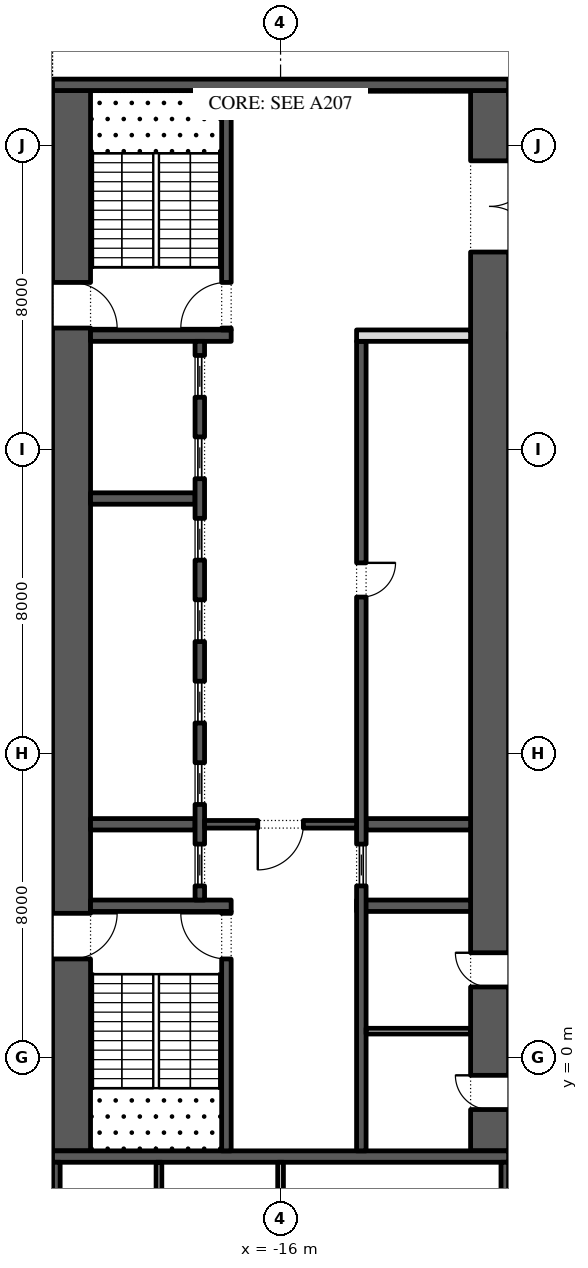
"""IFC4 building model, lengths in metres.
Left out: names, types, materials, properties, quantities, classifications, styles, units other than length and angle.
Written with IfcOpenShell. Run it as: python <this file> out.ifc"""

import sys

from ifc_helpers import new_model, si_unit, direction, frame, frame_2d, origin, place, context, subcontext, project, spatial, rectangle, extrude, element, fill, save


model = new_model("IFC4")
c1 = context("Model", 3, precision=1e-05, world=origin(), true_north=direction((0.0, 1.0)))
c2 = subcontext(c1, "Body", "Model", "MODEL_VIEW")
j1 = project(units=[si_unit("LENGTHUNIT", "METRE"), si_unit("PLANEANGLEUNIT", "RADIAN")], contexts=[c1])
p1 = place(None, origin())
s1 = spatial("IfcSite", under=j1, at=p1, CompositionType="ELEMENT")
p2 = place(p1, origin())
s2 = spatial("IfcBuilding", under=s1, at=p2, CompositionType="ELEMENT")
p3 = place(p2, frame((0.0, 0.0, 24.0)))
s3 = spatial("IfcBuildingStorey", under=s2, at=p3, CompositionType="ELEMENT", Elevation=24.0)
p4 = place(p3, frame((-21.5, -2.45, 0.0), z_axis=(0.0, 0.0, 1.0), x_axis=(0.0, 1.0, 0.0)))
e1 = element("IfcWall", 1, at=p4, inside=s3, PredefinedType="SHEAR", context=c2, shape_type="SweptSolid", body=[
    extrude(rectangle(XDim=27.9, YDim=1.0, at=frame_2d((13.95, 0.0))), origin(), (0.0, 0.0, 1.0), 4.5),
])
p5 = place(p4, frame((5.05, 0.0, 0.0)))
e2 = element("IfcOpeningElement", 2, at=p5, cuts=e1, PredefinedType="OPENING", context=c2, shape_type="SweptSolid", body=[
    extrude(rectangle(XDim=1.2, YDim=2.1, at=frame_2d((0.6, 1.05))), frame((0.0, 0.51, 0.0), z_axis=(0.0, -1.0, 0.0), x_axis=(1.0, 0.0, 0.0)), (0.0, 0.0, 1.0), 1.02),
])
p6 = place(p4, frame((21.65, 0.0, 0.0)))
e3 = element("IfcOpeningElement", 3, at=p6, cuts=e1, PredefinedType="OPENING", context=c2, shape_type="SweptSolid", body=[
    extrude(rectangle(XDim=1.2, YDim=2.1, at=frame_2d((0.6, 1.05))), frame((0.0, 0.51, 0.0), z_axis=(0.0, -1.0, 0.0), x_axis=(1.0, 0.0, 0.0)), (0.0, 0.0, 1.0), 1.02),
])
p7 = place(p3, frame((-10.5, -2.45, 0.0), z_axis=(0.0, 0.0, 1.0), x_axis=(0.0, 1.0, 0.0)))
e4 = element("IfcWall", 4, at=p7, inside=s3, PredefinedType="SHEAR", context=c2, shape_type="SweptSolid", body=[
    extrude(rectangle(XDim=27.9, YDim=1.0, at=frame_2d((13.95, 0.0))), origin(), (0.0, 0.0, 1.0), 4.5),
])
p8 = place(p7, frame((23.65, 0.0, 0.0)))
e5 = element("IfcOpeningElement", 5, at=p8, cuts=e4, PredefinedType="OPENING", context=c2, shape_type="SweptSolid", body=[
    extrude(rectangle(XDim=2.4, YDim=2.1, at=frame_2d((1.2, 1.05))), frame((0.0, 0.51, 0.0), z_axis=(0.0, -1.0, 0.0), x_axis=(1.0, 0.0, 0.0)), (0.0, 0.0, 1.0), 1.02),
])
p9 = place(p7, frame((1.087, 0.0, 0.0)))
e6 = element("IfcOpeningElement", 6, at=p9, cuts=e4, PredefinedType="OPENING", context=c2, shape_type="SweptSolid", body=[
    extrude(rectangle(XDim=0.9, YDim=2.1, at=frame_2d((0.45, 1.05))), frame((0.0, 0.51, 0.0), z_axis=(0.0, -1.0, 0.0), x_axis=(1.0, 0.0, 0.0)), (0.0, 0.0, 1.0), 1.02),
])
p10 = place(p7, frame((4.312, 0.0, 0.0)))
e7 = element("IfcOpeningElement", 7, at=p10, cuts=e4, PredefinedType="OPENING", context=c2, shape_type="SweptSolid", body=[
    extrude(rectangle(XDim=0.9, YDim=2.1, at=frame_2d((0.45, 1.05))), frame((0.0, 0.51, 0.0), z_axis=(0.0, -1.0, 0.0), x_axis=(1.0, 0.0, 0.0)), (0.0, 0.0, 1.0), 1.02),
])
for number, where, z_axis, x_axis in (
    (8, (-22.0, -2.6, 0.0), (0.0, 0.0, 1.0), (1.0, 0.0, 0.0)),
    (9, (-22.0, 25.6, 0.0), (0.0, 0.0, 1.0), (1.0, 0.0, 0.0)),
):
    element("IfcWall", number, at=place(p3, frame(where, z_axis=z_axis, x_axis=x_axis)), inside=s3, PredefinedType="SHEAR", context=c2, shape_type="SweptSolid", body=[
        extrude(rectangle(XDim=12.0, YDim=0.3, at=frame_2d((6.0, 0.0))), origin(), (0.0, 0.0, 1.0), 4.5),
    ])
p11 = place(p3, frame((-21.0, 4.0, 0.0), z_axis=(0.0, 0.0, 1.0), x_axis=(1.0, 0.0, 0.0)))
e10 = element("IfcWall", 10, at=p11, inside=s3, PredefinedType="SHEAR", context=c2, shape_type="SweptSolid", body=[
    extrude(rectangle(XDim=3.7, YDim=0.3, at=frame_2d((1.85, 0.0))), origin(), (0.0, 0.0, 1.0), 4.5),
])
p12 = place(p3, frame((-17.425, -2.45, 0.0), z_axis=(0.0, 0.0, 1.0), x_axis=(0.0, 1.0, 0.0)))
e11 = element("IfcWall", 11, at=p12, inside=s3, PredefinedType="SHEAR", context=c2, shape_type="SweptSolid", body=[
    extrude(rectangle(XDim=6.3, YDim=0.25, at=frame_2d((3.15, 0.0))), origin(), (0.0, 0.0, 1.0), 4.5),
])
p13 = place(p12, frame((5.05, 0.0, 0.0)))
e12 = element("IfcOpeningElement", 12, at=p13, cuts=e11, PredefinedType="OPENING", context=c2, shape_type="SweptSolid", body=[
    extrude(rectangle(XDim=1.2, YDim=2.1, at=frame_2d((0.6, 1.05))), frame((0.0, 0.135, 0.0), z_axis=(0.0, -1.0, 0.0), x_axis=(1.0, 0.0, 0.0)), (0.0, 0.0, 1.0), 0.27),
])
p14 = place(p3, frame((-21.0, 19.0, 0.0), z_axis=(0.0, 0.0, 1.0), x_axis=(1.0, 0.0, 0.0)))
e13 = element("IfcWall", 13, at=p14, inside=s3, PredefinedType="SHEAR", context=c2, shape_type="SweptSolid", body=[
    extrude(rectangle(XDim=3.7, YDim=0.3, at=frame_2d((1.85, 0.0))), origin(), (0.0, 0.0, 1.0), 4.5),
])
p15 = place(p3, frame((-17.425, 19.15, 0.0), z_axis=(0.0, 0.0, 1.0), x_axis=(0.0, 1.0, 0.0)))
e14 = element("IfcWall", 14, at=p15, inside=s3, PredefinedType="SHEAR", context=c2, shape_type="SweptSolid", body=[
    extrude(rectangle(XDim=6.3, YDim=0.25, at=frame_2d((3.15, 0.0))), origin(), (0.0, 0.0, 1.0), 4.5),
])
p16 = place(p15, frame((0.05, 0.0, 0.0)))
e15 = element("IfcOpeningElement", 15, at=p16, cuts=e14, PredefinedType="OPENING", context=c2, shape_type="SweptSolid", body=[
    extrude(rectangle(XDim=1.2, YDim=2.1, at=frame_2d((0.6, 1.05))), frame((0.0, 0.135, 0.0), z_axis=(0.0, -1.0, 0.0), x_axis=(1.0, 0.0, 0.0)), (0.0, 0.0, 1.0), 0.27),
])
for number, where, z_axis, x_axis in (
    (16, (-21.0, 6.143, 0.0), (0.0, 0.0, 1.0), (1.0, 0.0, 0.0)),
    (17, (-21.0, 14.714, 0.0), (0.0, 0.0, 1.0), (1.0, 0.0, 0.0)),
):
    element("IfcWall", number, at=place(p3, frame(where, z_axis=z_axis, x_axis=x_axis)), inside=s3, PredefinedType="SHEAR", context=c2, shape_type="SweptSolid", body=[
        extrude(rectangle(XDim=2.75, YDim=0.3, at=frame_2d((1.375, 0.0))), origin(), (0.0, 0.0, 1.0), 4.5),
    ])
p17 = place(p3, frame((-18.125, 4.15, 0.0), z_axis=(0.0, 0.0, 1.0), x_axis=(0.0, 1.0, 0.0)))
e18 = element("IfcWall", 18, at=p17, inside=s3, PredefinedType="SHEAR", context=c2, shape_type="SweptSolid", body=[
    extrude(rectangle(XDim=14.7, YDim=0.25, at=frame_2d((7.35, 0.0))), origin(), (0.0, 0.0, 1.0), 4.5),
])
p18 = place(p17, frame((0.371, 0.0, 0.0)))
e19 = element("IfcOpeningElement", 19, at=p18, cuts=e18, PredefinedType="OPENING", context=c2, shape_type="SweptSolid", body=[
    extrude(rectangle(XDim=1.1, YDim=2.1, at=frame_2d((0.55, 1.05))), frame((0.0, 0.135, 0.0), z_axis=(0.0, -1.0, 0.0), x_axis=(1.0, 0.0, 0.0)), (0.0, 0.0, 1.0), 0.27),
])
p19 = place(p17, frame((2.514, 0.0, 0.0)))
e20 = element("IfcOpeningElement", 20, at=p19, cuts=e18, PredefinedType="OPENING", context=c2, shape_type="SweptSolid", body=[
    extrude(rectangle(XDim=1.1, YDim=2.1, at=frame_2d((0.55, 1.05))), frame((0.0, 0.135, 0.0), z_axis=(0.0, -1.0, 0.0), x_axis=(1.0, 0.0, 0.0)), (0.0, 0.0, 1.0), 0.27),
])
p20 = place(p17, frame((4.657, 0.0, 0.0)))
e21 = element("IfcOpeningElement", 21, at=p20, cuts=e18, PredefinedType="OPENING", context=c2, shape_type="SweptSolid", body=[
    extrude(rectangle(XDim=1.1, YDim=2.1, at=frame_2d((0.55, 1.05))), frame((0.0, 0.135, 0.0), z_axis=(0.0, -1.0, 0.0), x_axis=(1.0, 0.0, 0.0)), (0.0, 0.0, 1.0), 0.27),
])
p21 = place(p17, frame((6.8, 0.0, 0.0)))
e22 = element("IfcOpeningElement", 22, at=p21, cuts=e18, PredefinedType="OPENING", context=c2, shape_type="SweptSolid", body=[
    extrude(rectangle(XDim=1.1, YDim=2.1, at=frame_2d((0.55, 1.05))), frame((0.0, 0.135, 0.0), z_axis=(0.0, -1.0, 0.0), x_axis=(1.0, 0.0, 0.0)), (0.0, 0.0, 1.0), 0.27),
])
p22 = place(p17, frame((8.943, 0.0, 0.0)))
e23 = element("IfcOpeningElement", 23, at=p22, cuts=e18, PredefinedType="OPENING", context=c2, shape_type="SweptSolid", body=[
    extrude(rectangle(XDim=1.1, YDim=2.1, at=frame_2d((0.55, 1.05))), frame((0.0, 0.135, 0.0), z_axis=(0.0, -1.0, 0.0), x_axis=(1.0, 0.0, 0.0)), (0.0, 0.0, 1.0), 0.27),
])
p23 = place(p17, frame((11.086, 0.0, 0.0)))
e24 = element("IfcOpeningElement", 24, at=p23, cuts=e18, PredefinedType="OPENING", context=c2, shape_type="SweptSolid", body=[
    extrude(rectangle(XDim=1.1, YDim=2.1, at=frame_2d((0.55, 1.05))), frame((0.0, 0.135, 0.0), z_axis=(0.0, -1.0, 0.0), x_axis=(1.0, 0.0, 0.0)), (0.0, 0.0, 1.0), 0.27),
])
p24 = place(p17, frame((13.229, 0.0, 0.0)))
e25 = element("IfcOpeningElement", 25, at=p24, cuts=e18, PredefinedType="OPENING", context=c2, shape_type="SweptSolid", body=[
    extrude(rectangle(XDim=1.1, YDim=2.1, at=frame_2d((0.55, 1.05))), frame((0.0, 0.135, 0.0), z_axis=(0.0, -1.0, 0.0), x_axis=(1.0, 0.0, 0.0)), (0.0, 0.0, 1.0), 0.27),
])
p25 = place(p3, frame((-14.0, 4.0, 0.0), z_axis=(0.0, 0.0, 1.0), x_axis=(1.0, 0.0, 0.0)))
e26 = element("IfcWall", 26, at=p25, inside=s3, PredefinedType="SHEAR", context=c2, shape_type="SweptSolid", body=[
    extrude(rectangle(XDim=3.0, YDim=0.3, at=frame_2d((1.5, 0.0))), origin(), (0.0, 0.0, 1.0), 4.5),
])
p26 = place(p3, frame((-13.75, 6.143, 0.0), z_axis=(0.0, 0.0, 1.0), x_axis=(1.0, 0.0, 0.0)))
e27 = element("IfcWall", 27, at=p26, inside=s3, PredefinedType="SHEAR", context=c2, shape_type="SweptSolid", body=[
    extrude(rectangle(XDim=2.75, YDim=0.3, at=frame_2d((1.375, 0.0))), origin(), (0.0, 0.0, 1.0), 4.5),
])
p27 = place(p3, frame((-13.875, -2.45, 0.0), z_axis=(0.0, 0.0, 1.0), x_axis=(0.0, 1.0, 0.0)))
e28 = element("IfcWall", 28, at=p27, inside=s3, PredefinedType="SHEAR", context=c2, shape_type="SweptSolid", body=[
    extrude(rectangle(XDim=21.3, YDim=0.25, at=frame_2d((10.65, 0.0))), origin(), (0.0, 0.0, 1.0), 4.5),
])
p28 = place(p27, frame((14.571, 0.0, 0.0)))
e29 = element("IfcOpeningElement", 29, at=p28, cuts=e28, PredefinedType="OPENING", context=c2, shape_type="SweptSolid", body=[
    extrude(rectangle(XDim=0.9, YDim=2.1, at=frame_2d((0.45, 1.05))), frame((0.0, 0.135, 0.0), z_axis=(0.0, -1.0, 0.0), x_axis=(1.0, 0.0, 0.0)), (0.0, 0.0, 1.0), 0.27),
])
p29 = place(p27, frame((6.971, 0.0, 0.0)))
e30 = element("IfcOpeningElement", 30, at=p29, cuts=e28, PredefinedType="OPENING", context=c2, shape_type="SweptSolid", body=[
    extrude(rectangle(XDim=1.1, YDim=2.1, at=frame_2d((0.55, 1.05))), frame((0.0, 0.135, 0.0), z_axis=(0.0, -1.0, 0.0), x_axis=(1.0, 0.0, 0.0)), (0.0, 0.0, 1.0), 0.27),
])
p30 = place(p3, frame((-14.0, 19.0, 0.0), z_axis=(0.0, 0.0, 1.0), x_axis=(1.0, 0.0, 0.0)))
e31 = element("IfcWall", 31, at=p30, inside=s3, PredefinedType="PARTITIONING", context=c2, shape_type="SweptSolid", body=[
    extrude(rectangle(XDim=3.0, YDim=0.3, at=frame_2d((1.5, 0.0))), origin(), (0.0, 0.0, 1.0), 4.5),
])
p31 = place(p3, frame((-18.0, 6.143, 0.0), z_axis=(0.0, 0.0, 1.0), x_axis=(1.0, 0.0, 0.0)))
e32 = element("IfcWall", 32, at=p31, inside=s3, PredefinedType="SHEAR", context=c2, shape_type="SweptSolid", body=[
    extrude(rectangle(XDim=4.0, YDim=0.2, at=frame_2d((2.0, 0.0))), origin(), (0.0, 0.0, 1.0), 4.5),
])
p32 = place(p31, frame((1.4, 0.0, 0.0)))
e33 = element("IfcOpeningElement", 33, at=p32, cuts=e32, PredefinedType="OPENING", context=c2, shape_type="SweptSolid", body=[
    extrude(rectangle(XDim=1.2, YDim=2.1, at=frame_2d((0.6, 1.05))), frame((0.0, 0.11, 0.0), z_axis=(0.0, -1.0, 0.0), x_axis=(1.0, 0.0, 0.0)), (0.0, 0.0, 1.0), 0.22),
])
p33 = place(p3, frame((-13.75, 0.7, 0.0), z_axis=(0.0, 0.0, 1.0), x_axis=(1.0, 0.0, 0.0)))
e34 = element("IfcWall", 34, at=p33, inside=s3, PredefinedType="PARTITIONING", context=c2, shape_type="SweptSolid", body=[
    extrude(rectangle(XDim=2.75, YDim=0.15, at=frame_2d((1.375, 0.0))), origin(), (0.0, 0.0, 1.0), 4.5),
])
p34 = place(p3, frame((-21.9, -15.8, 0.0), z_axis=(0.0, 0.0, 1.0), x_axis=(0.0, 1.0, 0.0)))
e35 = element("IfcWall", 35, at=p34, inside=s3, PredefinedType="SHEAR", context=c2, shape_type="SweptSolid", body=[
    extrude(rectangle(XDim=13.05, YDim=0.2, at=frame_2d((6.525, 0.0))), origin(), (0.0, 0.0, 1.0), 4.5),
])
p35 = place(p34, frame((4.488, 0.0, 0.0)))
e36 = element("IfcOpeningElement", 36, at=p35, cuts=e35, PredefinedType="OPENING", context=c2, shape_type="SweptSolid", body=[
    extrude(rectangle(XDim=0.9, YDim=2.1, at=frame_2d((0.45, 1.05))), frame((0.0, 0.11, 0.0), z_axis=(0.0, -1.0, 0.0), x_axis=(1.0, 0.0, 0.0)), (0.0, 0.0, 1.0), 0.22),
])
p36 = place(p34, frame((11.038, 0.0, 0.0)))
e37 = element("IfcOpeningElement", 37, at=p36, cuts=e35, PredefinedType="OPENING", context=c2, shape_type="SweptSolid", body=[
    extrude(rectangle(XDim=1.0, YDim=2.1, at=frame_2d((0.5, 1.05))), frame((0.0, 0.11, 0.0), z_axis=(0.0, -1.0, 0.0), x_axis=(1.0, 0.0, 0.0)), (0.0, 0.0, 1.0), 0.22),
])
p37 = place(p3, frame((-10.1, -15.8, 0.0), z_axis=(0.0, 0.0, 1.0), x_axis=(0.0, 1.0, 0.0)))
e38 = element("IfcWall", 38, at=p37, inside=s3, PredefinedType="SHEAR", context=c2, shape_type="SweptSolid", body=[
    extrude(rectangle(XDim=13.05, YDim=0.2, at=frame_2d((6.525, 0.0))), origin(), (0.0, 0.0, 1.0), 4.5),
])
p38 = place(p37, frame((2.762, 0.0, 0.0)))
e39 = element("IfcOpeningElement", 39, at=p38, cuts=e38, PredefinedType="OPENING", context=c2, shape_type="SweptSolid", body=[
    extrude(rectangle(XDim=0.9, YDim=2.1, at=frame_2d((0.45, 1.05))), frame((0.0, 0.11, 0.0), z_axis=(0.0, -1.0, 0.0), x_axis=(1.0, 0.0, 0.0)), (0.0, 0.0, 1.0), 0.22),
])
p39 = place(p37, frame((9.363, 0.0, 0.0)))
e40 = element("IfcOpeningElement", 40, at=p39, cuts=e38, PredefinedType="OPENING", context=c2, shape_type="SweptSolid", body=[
    extrude(rectangle(XDim=0.9, YDim=2.1, at=frame_2d((0.45, 1.05))), frame((0.0, 0.11, 0.0), z_axis=(0.0, -1.0, 0.0), x_axis=(1.0, 0.0, 0.0)), (0.0, 0.0, 1.0), 0.22),
])
p40 = place(p3, frame((-16.0, -15.8, 0.0), z_axis=(0.0, 0.0, 1.0), x_axis=(0.0, 1.0, 0.0)))
e41 = element("IfcWall", 41, at=p40, inside=s3, PredefinedType="PARTITIONING", context=c2, shape_type="SweptSolid", body=[
    extrude(rectangle(XDim=13.05, YDim=0.15, at=frame_2d((6.525, 0.0))), origin(), (0.0, 0.0, 1.0), 4.5),
])
p41 = place(p40, frame((11.087, 0.0, 0.0)))
e42 = element("IfcOpeningElement", 42, at=p41, cuts=e41, PredefinedType="OPENING", context=c2, shape_type="SweptSolid", body=[
    extrude(rectangle(XDim=0.9, YDim=2.1, at=frame_2d((0.45, 1.05))), frame((0.0, 0.085, 0.0), z_axis=(0.0, -1.0, 0.0), x_axis=(1.0, 0.0, 0.0)), (0.0, 0.0, 1.0), 0.17),
])
p42 = place(p3, frame((-19.2, -5.775, 0.0), z_axis=(0.0, 0.0, 1.0), x_axis=(0.0, 1.0, 0.0)))
e43 = element("IfcWall", 43, at=p42, inside=s3, PredefinedType="PARTITIONING", context=c2, shape_type="SweptSolid", body=[
    extrude(rectangle(XDim=3.025, YDim=0.15, at=frame_2d((1.512, 0.0))), origin(), (0.0, 0.0, 1.0), 4.5),
])
p43 = place(p3, frame((-10.0, 19.0, 0.0), z_axis=(0.0, 0.0, 1.0), x_axis=(1.0, 0.0, 0.0)))
e44 = element("IfcWall", 44, at=p43, inside=s3, PredefinedType="PARTITIONING", context=c2, shape_type="SweptSolid", body=[
    extrude(rectangle(XDim=7.925, YDim=0.15, at=frame_2d((3.962, 0.0))), origin(), (0.0, 0.0, 1.0), 4.5),
])
p44 = place(p3, frame((-10.0, 25.4, 0.0), z_axis=(0.0, 0.0, 1.0), x_axis=(1.0, 0.0, 0.0)))
e45 = element("IfcWall", 45, at=p44, inside=s3, PredefinedType="PARTITIONING", context=c2, shape_type="SweptSolid", body=[
    extrude(rectangle(XDim=7.925, YDim=0.15, at=frame_2d((3.962, 0.0))), origin(), (0.0, 0.0, 1.0), 4.5),
])
p45 = place(p44, frame((3.462, 0.0, 0.0)))
e46 = element("IfcOpeningElement", 46, at=p45, cuts=e45, PredefinedType="OPENING", context=c2, shape_type="SweptSolid", body=[
    extrude(rectangle(XDim=1.0, YDim=2.1, at=frame_2d((0.5, 1.05))), frame((0.0, 0.085, 0.0), z_axis=(0.0, -1.0, 0.0), x_axis=(1.0, 0.0, 0.0)), (0.0, 0.0, 1.0), 0.17),
])
p46 = place(p18, origin())
e47 = element("IfcDoor", 47, at=p46, inside=s3, OperationType="SLIDING_TO_LEFT", PredefinedType="DOOR", context=c2, shape_type="SweptSolid", body=[
    extrude(rectangle(XDim=1.1, YDim=2.1, at=frame_2d((0.55, 1.05))), frame((0.0, 0.025, 0.0), z_axis=(0.0, -1.0, 0.0), x_axis=(1.0, 0.0, 0.0)), (0.0, 0.0, 1.0), 0.05),
])
fill(e19, e47)
p47 = place(p19, origin())
e48 = element("IfcDoor", 48, at=p47, inside=s3, OperationType="SLIDING_TO_LEFT", PredefinedType="DOOR", context=c2, shape_type="SweptSolid", body=[
    extrude(rectangle(XDim=1.1, YDim=2.1, at=frame_2d((0.55, 1.05))), frame((0.0, 0.025, 0.0), z_axis=(0.0, -1.0, 0.0), x_axis=(1.0, 0.0, 0.0)), (0.0, 0.0, 1.0), 0.05),
])
fill(e20, e48)
p48 = place(p20, origin())
e49 = element("IfcDoor", 49, at=p48, inside=s3, OperationType="SLIDING_TO_LEFT", PredefinedType="DOOR", context=c2, shape_type="SweptSolid", body=[
    extrude(rectangle(XDim=1.1, YDim=2.1, at=frame_2d((0.55, 1.05))), frame((0.0, 0.025, 0.0), z_axis=(0.0, -1.0, 0.0), x_axis=(1.0, 0.0, 0.0)), (0.0, 0.0, 1.0), 0.05),
])
fill(e21, e49)
p49 = place(p21, origin())
e50 = element("IfcDoor", 50, at=p49, inside=s3, OperationType="SLIDING_TO_LEFT", PredefinedType="DOOR", context=c2, shape_type="SweptSolid", body=[
    extrude(rectangle(XDim=1.1, YDim=2.1, at=frame_2d((0.55, 1.05))), frame((0.0, 0.025, 0.0), z_axis=(0.0, -1.0, 0.0), x_axis=(1.0, 0.0, 0.0)), (0.0, 0.0, 1.0), 0.05),
])
fill(e22, e50)
p50 = place(p22, origin())
e51 = element("IfcDoor", 51, at=p50, inside=s3, OperationType="SLIDING_TO_LEFT", PredefinedType="DOOR", context=c2, shape_type="SweptSolid", body=[
    extrude(rectangle(XDim=1.1, YDim=2.1, at=frame_2d((0.55, 1.05))), frame((0.0, 0.025, 0.0), z_axis=(0.0, -1.0, 0.0), x_axis=(1.0, 0.0, 0.0)), (0.0, 0.0, 1.0), 0.05),
])
fill(e23, e51)
p51 = place(p23, origin())
e52 = element("IfcDoor", 52, at=p51, inside=s3, OperationType="SLIDING_TO_LEFT", PredefinedType="DOOR", context=c2, shape_type="SweptSolid", body=[
    extrude(rectangle(XDim=1.1, YDim=2.1, at=frame_2d((0.55, 1.05))), frame((0.0, 0.025, 0.0), z_axis=(0.0, -1.0, 0.0), x_axis=(1.0, 0.0, 0.0)), (0.0, 0.0, 1.0), 0.05),
])
fill(e24, e52)
p52 = place(p24, origin())
e53 = element("IfcDoor", 53, at=p52, inside=s3, OperationType="SLIDING_TO_LEFT", PredefinedType="DOOR", context=c2, shape_type="SweptSolid", body=[
    extrude(rectangle(XDim=1.1, YDim=2.1, at=frame_2d((0.55, 1.05))), frame((0.0, 0.025, 0.0), z_axis=(0.0, -1.0, 0.0), x_axis=(1.0, 0.0, 0.0)), (0.0, 0.0, 1.0), 0.05),
])
fill(e25, e53)
p53 = place(p28, frame((0.9, -0.2, 0.0), z_axis=(0.0, 0.0, 1.0), x_axis=(-1.0, 0.0, 0.0)))
e54 = element("IfcDoor", 54, at=p53, inside=s3, OperationType="SINGLE_SWING_RIGHT", PredefinedType="DOOR", context=c2, shape_type="SweptSolid", body=[
    extrude(rectangle(XDim=0.9, YDim=2.1, at=frame_2d((0.45, 1.05))), frame((0.0, -0.075, 0.0), z_axis=(0.0, -1.0, 0.0), x_axis=(1.0, 0.0, 0.0)), (0.0, 0.0, 1.0), 0.05),
])
fill(e29, e54)
p54 = place(p29, origin())
e55 = element("IfcDoor", 55, at=p54, inside=s3, OperationType="SLIDING_TO_LEFT", PredefinedType="DOOR", context=c2, shape_type="SweptSolid", body=[
    extrude(rectangle(XDim=1.1, YDim=2.1, at=frame_2d((0.55, 1.05))), frame((0.0, 0.025, 0.0), z_axis=(0.0, -1.0, 0.0), x_axis=(1.0, 0.0, 0.0)), (0.0, 0.0, 1.0), 0.05),
])
fill(e30, e55)
p55 = place(p32, frame((1.2, 0.0, 0.0), z_axis=(0.0, 0.0, 1.0), x_axis=(-1.0, 0.0, 0.0)))
e56 = element("IfcDoor", 56, at=p55, inside=s3, OperationType="SINGLE_SWING_LEFT", PredefinedType="DOOR", context=c2, shape_type="SweptSolid", body=[
    extrude(rectangle(XDim=1.2, YDim=2.1, at=frame_2d((0.6, 1.05))), frame((0.0, 0.025, 0.0), z_axis=(0.0, -1.0, 0.0), x_axis=(1.0, 0.0, 0.0)), (0.0, 0.0, 1.0), 0.05),
])
fill(e33, e56)
p56 = place(p8, frame((2.4, 0.0, 0.0), z_axis=(0.0, 0.0, 1.0), x_axis=(-1.0, 0.0, 0.0)))
e57 = element("IfcDoor", 57, at=p56, inside=s3, OperationType="DOUBLE_DOOR_SINGLE_SWING", PredefinedType="DOOR", context=c2, shape_type="SweptSolid", body=[
    extrude(rectangle(XDim=2.4, YDim=2.1, at=frame_2d((1.2, 1.05))), frame((0.0, 0.025, 0.0), z_axis=(0.0, -1.0, 0.0), x_axis=(1.0, 0.0, 0.0)), (0.0, 0.0, 1.0), 0.05),
])
fill(e5, e57)
p57 = place(p13, origin())
e58 = element("IfcDoor", 58, at=p57, inside=s3, OperationType="SINGLE_SWING_LEFT", PredefinedType="DOOR", context=c2, shape_type="SweptSolid", body=[
    extrude(rectangle(XDim=1.2, YDim=2.1, at=frame_2d((0.6, 1.05))), frame((0.0, 0.025, 0.0), z_axis=(0.0, -1.0, 0.0), x_axis=(1.0, 0.0, 0.0)), (0.0, 0.0, 1.0), 0.05),
])
fill(e12, e58)
p58 = place(p5, frame((1.2, 0.0, 0.0), z_axis=(0.0, 0.0, 1.0), x_axis=(-1.0, 0.0, 0.0)))
e59 = element("IfcDoor", 59, at=p58, inside=s3, OperationType="SINGLE_SWING_RIGHT", PredefinedType="DOOR", context=c2, shape_type="SweptSolid", body=[
    extrude(rectangle(XDim=1.2, YDim=2.1, at=frame_2d((0.6, 1.05))), frame((0.0, 0.025, 0.0), z_axis=(0.0, -1.0, 0.0), x_axis=(1.0, 0.0, 0.0)), (0.0, 0.0, 1.0), 0.05),
])
fill(e2, e59)
p59 = place(p16, origin())
e60 = element("IfcDoor", 60, at=p59, inside=s3, OperationType="SINGLE_SWING_RIGHT", PredefinedType="DOOR", context=c2, shape_type="SweptSolid", body=[
    extrude(rectangle(XDim=1.2, YDim=2.1, at=frame_2d((0.6, 1.05))), frame((0.0, 0.025, 0.0), z_axis=(0.0, -1.0, 0.0), x_axis=(1.0, 0.0, 0.0)), (0.0, 0.0, 1.0), 0.05),
])
fill(e15, e60)
p60 = place(p6, frame((1.2, 0.0, 0.0), z_axis=(0.0, 0.0, 1.0), x_axis=(-1.0, 0.0, 0.0)))
e61 = element("IfcDoor", 61, at=p60, inside=s3, OperationType="SINGLE_SWING_LEFT", PredefinedType="DOOR", context=c2, shape_type="SweptSolid", body=[
    extrude(rectangle(XDim=1.2, YDim=2.1, at=frame_2d((0.6, 1.05))), frame((0.0, 0.025, 0.0), z_axis=(0.0, -1.0, 0.0), x_axis=(1.0, 0.0, 0.0)), (0.0, 0.0, 1.0), 0.05),
])
fill(e3, e61)
p61 = place(p9, origin())
e62 = element("IfcDoor", 62, at=p61, inside=s3, OperationType="SINGLE_SWING_LEFT", PredefinedType="DOOR", context=c2, shape_type="SweptSolid", body=[
    extrude(rectangle(XDim=0.9, YDim=2.1, at=frame_2d((0.45, 1.05))), frame((0.0, 0.5, 0.0), z_axis=(0.0, -1.0, 0.0), x_axis=(1.0, 0.0, 0.0)), (0.0, 0.0, 1.0), 0.05),
])
fill(e6, e62)
p62 = place(p10, origin())
e63 = element("IfcDoor", 63, at=p62, inside=s3, OperationType="SINGLE_SWING_LEFT", PredefinedType="DOOR", context=c2, shape_type="SweptSolid", body=[
    extrude(rectangle(XDim=0.9, YDim=2.1, at=frame_2d((0.45, 1.05))), frame((0.0, 0.5, 0.0), z_axis=(0.0, -1.0, 0.0), x_axis=(1.0, 0.0, 0.0)), (0.0, 0.0, 1.0), 0.05),
])
fill(e7, e63)
save(model, sys.argv[1])
